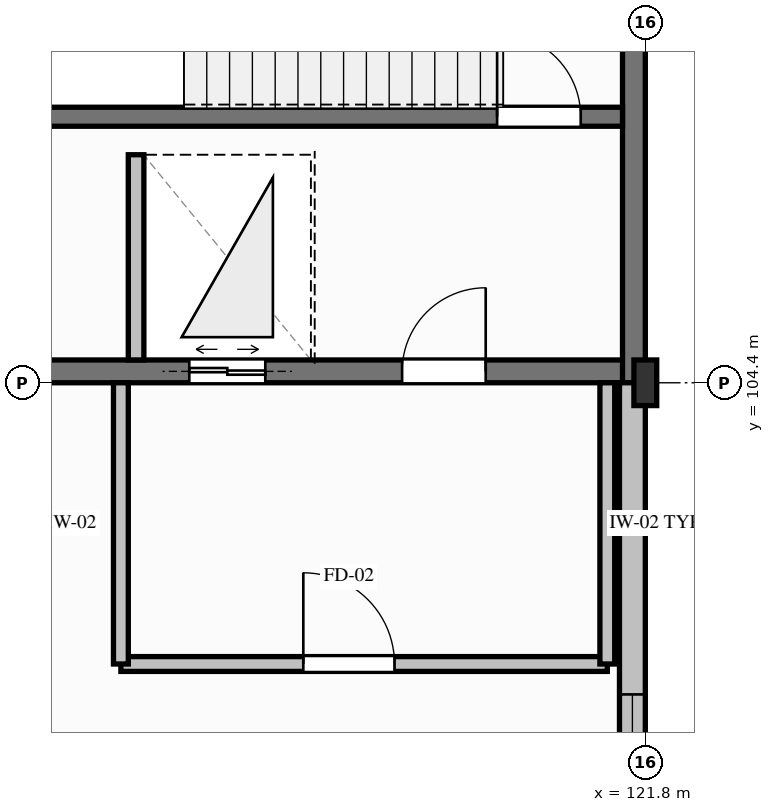
"""IFC4 building model, lengths in metres.
Left out: names, types, materials, properties, quantities, classifications, styles, units other than length and angle.
Written with IfcOpenShell. Run it as: python <this file> out.ifc"""

import sys

from ifc_helpers import new_model, si_unit, direction, frame, frame_2d, origin, origin_2d, place, context, subcontext, project, spatial, rectangle, i_section, extrude, element, fill, save


model = new_model("IFC4")
c1 = context("Model", 3, precision=1e-05, world=origin(), true_north=direction((0.0, 1.0)))
c2 = subcontext(c1, "Body", "Model", "MODEL_VIEW")
j1 = project(units=[si_unit("LENGTHUNIT", "METRE"), si_unit("PLANEANGLEUNIT", "RADIAN")], contexts=[c1])
p1 = place(None, origin())
s1 = spatial("IfcSite", under=j1, at=p1, CompositionType="ELEMENT")
p2 = place(p1, origin())
s2 = spatial("IfcBuilding", under=s1, at=p2, CompositionType="ELEMENT")
p3 = place(p2, frame((0.0, 0.0, 4.5)))
s3 = spatial("IfcBuildingStorey", under=s2, at=p3, CompositionType="ELEMENT", Elevation=4.5)
p4 = place(p3, frame((113.4, 104.55, 0.0), z_axis=(0.0, 0.0, 1.0), x_axis=(1.0, 0.0, 0.0)))
e1 = element("IfcWall", 1, at=p4, inside=s3, PredefinedType="SHEAR", context=c2, shape_type="SweptSolid", body=[
    extrude(rectangle(XDim=8.4, YDim=0.3, at=frame_2d((4.2, 0.0))), origin(), (0.0, 0.0, 1.0), 4.5),
])
p5 = place(p4, frame((5.2, 0.0, 0.0)))
e2 = element("IfcOpeningElement", 2, at=p5, cuts=e1, PredefinedType="OPENING", context=c2, shape_type="SweptSolid", body=[
    extrude(rectangle(XDim=1.1, YDim=2.15, at=frame_2d((0.55, 1.075))), frame((0.0, 0.16, 0.0), z_axis=(0.0, -1.0, 0.0), x_axis=(1.0, 0.0, 0.0)), (0.0, 0.0, 1.0), 0.32),
])
p6 = place(p4, frame((2.4, 0.0, 0.0)))
e3 = element("IfcOpeningElement", 3, at=p6, cuts=e1, PredefinedType="OPENING", context=c2, shape_type="SweptSolid", body=[
    extrude(rectangle(XDim=1.0, YDim=2.1, at=frame_2d((0.5, 1.05))), frame((0.0, 0.16, 0.0), z_axis=(0.0, -1.0, 0.0), x_axis=(1.0, 0.0, 0.0)), (0.0, 0.0, 1.0), 0.32),
])
p7 = place(p3, frame((121.65, 111.6, 0.0), z_axis=(0.0, 0.0, 1.0), x_axis=(0.0, -1.0, 0.0)))
e4 = element("IfcWall", 4, at=p7, inside=s3, PredefinedType="SHEAR", context=c2, shape_type="SweptSolid", body=[
    extrude(rectangle(XDim=7.2, YDim=0.3, at=frame_2d((3.6, 0.0))), origin(), (0.0, 0.0, 1.0), 4.5),
])
p8 = place(p3, frame((113.7, 107.9, 0.0), z_axis=(0.0, 0.0, 1.0), x_axis=(1.0, 0.0, 0.0)))
e5 = element("IfcWall", 5, at=p8, inside=s3, PredefinedType="SHEAR", context=c2, shape_type="SweptSolid", body=[
    extrude(rectangle(XDim=7.8, YDim=0.25, at=frame_2d((3.9, 0.0))), origin(), (0.0, 0.0, 1.0), 4.5),
])
p9 = place(p8, frame((6.15, 0.0, 0.0)))
e6 = element("IfcOpeningElement", 6, at=p9, cuts=e5, PredefinedType="OPENING", context=c2, shape_type="SweptSolid", body=[
    extrude(rectangle(XDim=1.1, YDim=2.15, at=frame_2d((0.55, 1.075))), frame((0.0, 0.135, 0.0), z_axis=(0.0, -1.0, 0.0), x_axis=(1.0, 0.0, 0.0)), (0.0, 0.0, 1.0), 0.27),
])
p10 = place(p3, frame((121.8, 104.4, 0.0), z_axis=(0.0, 0.0, 1.0), x_axis=(1.0, 0.0, 0.0)))
e7 = element("IfcColumn", 7, at=p10, inside=s3, PredefinedType="COLUMN", context=c2, shape_type="SweptSolid", body=[
    extrude(i_section(OverallWidth=0.3, OverallDepth=0.6, WebThickness=0.015, FlangeThickness=0.03, FilletRadius=0.027, at=origin_2d()), origin(), (0.0, 0.0, 1.0), 4.5),
])
p11 = place(p3, frame((121.63, 104.4, 0.0), z_axis=(0.0, 0.0, 1.0), x_axis=(0.0, -1.0, 0.0)))
e8 = element("IfcWall", 8, at=p11, inside=s3, PredefinedType="SOLIDWALL", context=c2, shape_type="SweptSolid", body=[
    extrude(rectangle(XDim=14.4, YDim=0.34, at=frame_2d((7.2, 0.0))), origin(), (0.0, 0.0, 1.0), 3.678),
])
p12 = place(p11, frame((4.1, 0.0, 0.85)))
e9 = element("IfcOpeningElement", 9, at=p12, cuts=e8, PredefinedType="OPENING", context=c2, shape_type="SweptSolid", body=[
    extrude(rectangle(XDim=1.4, YDim=1.65, at=frame_2d((0.7, 0.825))), frame((0.0, 0.18, 0.0), z_axis=(0.0, -1.0, 0.0), x_axis=(1.0, 0.0, 0.0)), (0.0, 0.0, 1.0), 0.36),
])
p13 = place(p11, frame((8.75, 0.0, 0.85)))
e10 = element("IfcOpeningElement", 10, at=p13, cuts=e8, PredefinedType="OPENING", context=c2, shape_type="SweptSolid", body=[
    extrude(rectangle(XDim=1.7, YDim=1.75, at=frame_2d((0.85, 0.875))), frame((0.0, 0.18, 0.0), z_axis=(0.0, -1.0, 0.0), x_axis=(1.0, 0.0, 0.0)), (0.0, 0.0, 1.0), 0.36),
])
p14 = place(p3, frame((115.1, 104.7, 0.0), z_axis=(0.0, 0.0, 1.0), x_axis=(0.0, 1.0, 0.0)))
e11 = element("IfcWall", 11, at=p14, inside=s3, PredefinedType="PARTITIONING", context=c2, shape_type="SweptSolid", body=[
    extrude(rectangle(XDim=2.7, YDim=0.205, at=frame_2d((1.35, 0.0))), origin(), (0.0, 0.0, 1.0), 4.23),
])
p15 = place(p3, frame((114.9, 100.7, 0.0), z_axis=(0.0, 0.0, 1.0), x_axis=(1.0, 0.0, 0.0)))
e12 = element("IfcWall", 12, at=p15, inside=s3, PredefinedType="PARTITIONING", context=c2, shape_type="SweptSolid", body=[
    extrude(rectangle(XDim=6.4, YDim=0.195, at=frame_2d((3.2, 0.0))), origin(), (0.0, 0.0, 1.0), 4.23),
])
p16 = place(p15, frame((2.4, 0.0, 0.0)))
e13 = element("IfcOpeningElement", 13, at=p16, cuts=e12, PredefinedType="OPENING", context=c2, shape_type="SweptSolid", body=[
    extrude(rectangle(XDim=1.2, YDim=2.15, at=frame_2d((0.6, 1.075))), frame((0.0, 0.107, 0.0), z_axis=(0.0, -1.0, 0.0), x_axis=(1.0, 0.0, 0.0)), (0.0, 0.0, 1.0), 0.215),
])
for number, where, z_axis, x_axis in (
    (14, (121.3, 100.7, 0.0), (0.0, 0.0, 1.0), (0.0, 1.0, 0.0)),
    (15, (114.9, 100.7, 0.0), (0.0, 0.0, 1.0), (0.0, 1.0, 0.0)),
):
    element("IfcWall", number, at=place(p3, frame(where, z_axis=z_axis, x_axis=x_axis)), inside=s3, PredefinedType="PARTITIONING", context=c2, shape_type="SweptSolid", body=[
        extrude(rectangle(XDim=3.7, YDim=0.195, at=frame_2d((1.85, 0.0))), origin(), (0.0, 0.0, 1.0), 3.778),
    ])
p17 = place(p12, origin())
e16 = element("IfcWindow", 16, at=p17, inside=s3, PartitioningType="SINGLE_PANEL", PredefinedType="WINDOW", context=c2, shape_type="SweptSolid", body=[
    extrude(rectangle(XDim=1.4, YDim=1.65, at=frame_2d((0.7, 0.825))), frame((0.0, 0.03, 0.0), z_axis=(0.0, -1.0, 0.0), x_axis=(1.0, 0.0, 0.0)), (0.0, 0.0, 1.0), 0.06),
])
fill(e9, e16)
p18 = place(p9, origin())
e17 = element("IfcDoor", 17, at=p18, inside=s3, OperationType="SINGLE_SWING_LEFT", PredefinedType="DOOR", context=c2, shape_type="SweptSolid", body=[
    extrude(rectangle(XDim=1.1, YDim=2.15, at=frame_2d((0.55, 1.075))), frame((0.0, 0.025, 0.0), z_axis=(0.0, -1.0, 0.0), x_axis=(1.0, 0.0, 0.0)), (0.0, 0.0, 1.0), 0.05),
])
fill(e6, e17)
p19 = place(p5, origin())
e18 = element("IfcDoor", 18, at=p19, inside=s3, OperationType="SINGLE_SWING_RIGHT", PredefinedType="DOOR", context=c2, shape_type="SweptSolid", body=[
    extrude(rectangle(XDim=1.1, YDim=2.15, at=frame_2d((0.55, 1.075))), frame((0.0, 0.025, 0.0), z_axis=(0.0, -1.0, 0.0), x_axis=(1.0, 0.0, 0.0)), (0.0, 0.0, 1.0), 0.05),
])
fill(e2, e18)
p20 = place(p6, origin())
e19 = element("IfcDoor", 19, at=p20, inside=s3, OperationType="DOUBLE_DOOR_SLIDING", PredefinedType="DOOR", context=c2, shape_type="SweptSolid", body=[
    extrude(rectangle(XDim=1.0, YDim=2.1, at=frame_2d((0.5, 1.05))), frame((0.0, 0.025, 0.0), z_axis=(0.0, -1.0, 0.0), x_axis=(1.0, 0.0, 0.0)), (0.0, 0.0, 1.0), 0.05),
])
fill(e3, e19)
p21 = place(p16, origin())
e20 = element("IfcDoor", 20, at=p21, inside=s3, OperationType="SINGLE_SWING_LEFT", PredefinedType="DOOR", context=c2, shape_type="SweptSolid", body=[
    extrude(rectangle(XDim=1.2, YDim=2.15, at=frame_2d((0.6, 1.075))), frame((0.0, 0.025, 0.0), z_axis=(0.0, -1.0, 0.0), x_axis=(1.0, 0.0, 0.0)), (0.0, 0.0, 1.0), 0.05),
])
fill(e13, e20)
save(model, sys.argv[1])
